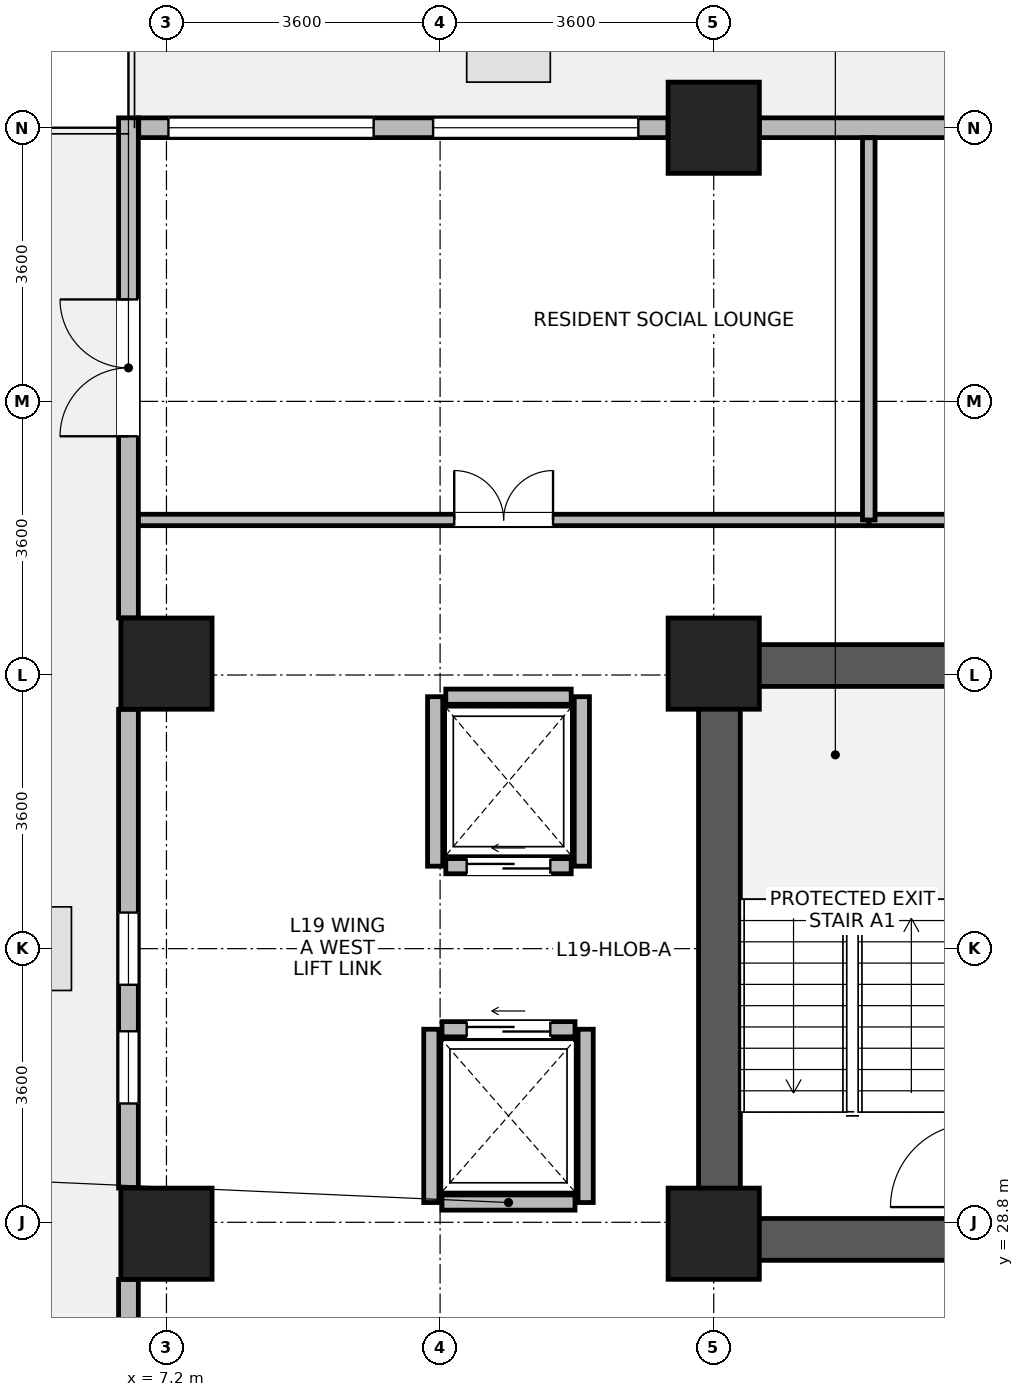
"""IFC4 building model, lengths in metres.
Left out: names, types, materials, properties, quantities, classifications, styles, units other than length and angle.
Written with IfcOpenShell. Run it as: python <this file> out.ifc"""

import sys

from ifc_helpers import new_model, si_unit, direction, frame, frame_2d, origin, origin_2d, place, context, subcontext, project, spatial, rectangle, extrude, source, transform, mapped, element, fill, save


model = new_model("IFC4")
c1 = context("Model", 3, precision=1e-05, world=origin(), true_north=direction((0.0, 1.0)))
c2 = subcontext(c1, "Body", "Model", "MODEL_VIEW")
j1 = project(units=[si_unit("LENGTHUNIT", "METRE"), si_unit("PLANEANGLEUNIT", "RADIAN")], contexts=[c1])
p1 = place(None, origin())
s1 = spatial("IfcSite", under=j1, at=p1, CompositionType="ELEMENT")
p2 = place(p1, origin())
s2 = spatial("IfcBuilding", under=s1, at=p2, CompositionType="ELEMENT")
p3 = place(p2, frame((0.0, 0.0, 78.6)))
s3 = spatial("IfcBuildingStorey", under=s2, at=p3, CompositionType="ELEMENT", Elevation=78.6)
p4 = place(p3, frame((14.475, 28.3, 0.0), z_axis=(0.0, 0.0, 1.0), x_axis=(0.0, 1.0, 0.0)))
e1 = element("IfcWall", 1, at=p4, inside=s3, PredefinedType="SHEAR", context=c2, shape_type="SweptSolid", body=[
    extrude(rectangle(XDim=8.1, YDim=0.55, at=frame_2d((4.05, 0.0))), origin(), (0.0, 0.0, 1.0), 3.45),
])
for number, where, z_axis, x_axis in (
    (2, (14.75, 28.575, 0.0), (0.0, 0.0, 1.0), (1.0, 0.0, 0.0)),
    (3, (14.75, 36.125, 0.0), (0.0, 0.0, 1.0), (1.0, 0.0, 0.0)),
):
    element("IfcWall", number, at=place(p3, frame(where, z_axis=z_axis, x_axis=x_axis)), inside=s3, PredefinedType="SHEAR", context=c2, shape_type="SweptSolid", body=[
        extrude(rectangle(XDim=3.2, YDim=0.55, at=frame_2d((1.6, 0.0))), origin(), (0.0, 0.0, 1.0), 3.45),
    ])
m1 = source(origin(), c2, "Body", "SweptSolid", [
    extrude(rectangle(XDim=1.2, YDim=1.2, at=origin_2d()), origin(), (0.0, 0.0, 1.0), 3.7),
])
for number, where, z_axis, x_axis in (
    (4, (7.2, 28.65, 0.0), (0.0, 0.0, 1.0), (1.0, 0.0, 0.0)),
    (5, (7.2, 36.15, 0.0), (0.0, 0.0, 1.0), (1.0, 0.0, 0.0)),
    (6, (14.4, 28.65, 0.0), (0.0, 0.0, 1.0), (1.0, 0.0, 0.0)),
    (7, (14.4, 36.15, 0.0), (0.0, 0.0, 1.0), (1.0, 0.0, 0.0)),
    (8, (14.4, 43.2, 0.0), (0.0, 0.0, 1.0), (1.0, 0.0, 0.0)),
):
    element("IfcColumn", number, at=place(p3, frame(where, z_axis=z_axis, x_axis=x_axis)), inside=s3, PredefinedType="COLUMN", context=c2, shape_type="MappedRepresentation", body=[
        mapped(m1, transform((0.0, 0.0, 0.0), x_axis=(1.0, 0.0, 0.0), y_axis=(0.0, 1.0, 0.0), z_axis=(0.0, 0.0, 1.0), scale=1.0)),
    ])
p5 = place(p3, frame((15.001, 43.2, 0.0), z_axis=(0.0, 0.0, 1.0), x_axis=(1.0, 0.0, 0.0)))
e9 = element("IfcWall", 9, at=p5, inside=s3, PredefinedType="STANDARD", context=c2, shape_type="SweptSolid", body=[
    extrude(rectangle(XDim=2.793, YDim=0.26, at=frame_2d((1.397, 0.0))), origin(), (0.0, 0.0, 1.0), 2.93),
])
p6 = place(p3, frame((6.835, 43.2, 0.0), z_axis=(0.0, 0.0, 1.0), x_axis=(1.0, 0.0, 0.0)))
e10 = element("IfcWall", 10, at=p6, inside=s3, PredefinedType="STANDARD", context=c2, shape_type="SweptSolid", body=[
    extrude(rectangle(XDim=6.964, YDim=0.26, at=frame_2d((3.482, 0.0))), origin(), (0.0, 0.0, 1.0), 3.43),
])
p7 = place(p6, frame((0.391, 0.0, 0.85)))
e11 = element("IfcOpeningElement", 11, at=p7, cuts=e10, PredefinedType="OPENING", context=c2, shape_type="SweptSolid", body=[
    extrude(rectangle(XDim=2.7, YDim=2.05, at=frame_2d((1.35, 1.025))), frame((0.0, 0.14, 0.0), z_axis=(0.0, -1.0, 0.0), x_axis=(1.0, 0.0, 0.0)), (0.0, 0.0, 1.0), 0.28),
])
p8 = place(p6, frame((3.873, 0.0, 0.85)))
e12 = element("IfcOpeningElement", 12, at=p8, cuts=e10, PredefinedType="OPENING", context=c2, shape_type="SweptSolid", body=[
    extrude(rectangle(XDim=2.7, YDim=2.05, at=frame_2d((1.35, 1.025))), frame((0.0, 0.14, 0.0), z_axis=(0.0, -1.0, 0.0), x_axis=(1.0, 0.0, 0.0)), (0.0, 0.0, 1.0), 0.28),
])
p9 = place(p3, frame((6.7, 36.751, 0.0), z_axis=(0.0, 0.0, 1.0), x_axis=(0.0, 1.0, 0.0)))
e13 = element("IfcWall", 13, at=p9, inside=s3, PredefinedType="STANDARD", context=c2, shape_type="SweptSolid", body=[
    extrude(rectangle(XDim=6.579, YDim=0.26, at=frame_2d((3.29, 0.0))), origin(), (0.0, 0.0, 1.0), 3.43),
])
p10 = place(p9, frame((2.39, 0.0, 0.0)))
e14 = element("IfcOpeningElement", 14, at=p10, cuts=e13, PredefinedType="OPENING", context=c2, shape_type="SweptSolid", body=[
    extrude(rectangle(XDim=1.8, YDim=2.2, at=frame_2d((0.9, 1.1))), frame((0.0, 0.14, 0.0), z_axis=(0.0, -1.0, 0.0), x_axis=(1.0, 0.0, 0.0)), (0.0, 0.0, 1.0), 0.28),
])
p11 = place(p3, frame((6.7, 29.251, 0.0), z_axis=(0.0, 0.0, 1.0), x_axis=(0.0, 1.0, 0.0)))
e15 = element("IfcWall", 15, at=p11, inside=s3, PredefinedType="STANDARD", context=c2, shape_type="SweptSolid", body=[
    extrude(rectangle(XDim=6.298, YDim=0.26, at=frame_2d((3.149, 0.0))), origin(), (0.0, 0.0, 1.0), 3.43),
])
p12 = place(p11, frame((2.674, 0.0, 0.85)))
e16 = element("IfcOpeningElement", 16, at=p12, cuts=e15, PredefinedType="OPENING", context=c2, shape_type="SweptSolid", body=[
    extrude(rectangle(XDim=0.95, YDim=1.75, at=frame_2d((0.475, 0.875))), frame((0.0, 0.14, 0.0), z_axis=(0.0, -1.0, 0.0), x_axis=(1.0, 0.0, 0.0)), (0.0, 0.0, 1.0), 0.28),
])
p13 = place(p11, frame((1.112, 0.0, 0.85)))
e17 = element("IfcOpeningElement", 17, at=p13, cuts=e15, PredefinedType="OPENING", context=c2, shape_type="SweptSolid", body=[
    extrude(rectangle(XDim=0.95, YDim=1.75, at=frame_2d((0.475, 0.875))), frame((0.0, 0.14, 0.0), z_axis=(0.0, -1.0, 0.0), x_axis=(1.0, 0.0, 0.0)), (0.0, 0.0, 1.0), 0.28),
])
p14 = place(p3, frame((6.7, 21.47, 0.0), z_axis=(0.0, 0.0, 1.0), x_axis=(0.0, 1.0, 0.0)))
e18 = element("IfcWall", 18, at=p14, inside=s3, PredefinedType="STANDARD", context=c2, shape_type="SweptSolid", body=[
    extrude(rectangle(XDim=6.579, YDim=0.26, at=frame_2d((3.29, 0.0))), origin(), (0.0, 0.0, 1.0), 3.43),
])
p15 = place(p14, frame((2.814, 0.0, 0.85)))
e19 = element("IfcOpeningElement", 19, at=p15, cuts=e18, PredefinedType="OPENING", context=c2, shape_type="SweptSolid", body=[
    extrude(rectangle(XDim=0.95, YDim=1.75, at=frame_2d((0.475, 0.875))), frame((0.0, 0.14, 0.0), z_axis=(0.0, -1.0, 0.0), x_axis=(1.0, 0.0, 0.0)), (0.0, 0.0, 1.0), 0.28),
])
p16 = place(p14, frame((1.183, 0.0, 0.85)))
e20 = element("IfcOpeningElement", 20, at=p16, cuts=e18, PredefinedType="OPENING", context=c2, shape_type="SweptSolid", body=[
    extrude(rectangle(XDim=0.95, YDim=1.75, at=frame_2d((0.475, 0.875))), frame((0.0, 0.14, 0.0), z_axis=(0.0, -1.0, 0.0), x_axis=(1.0, 0.0, 0.0)), (0.0, 0.0, 1.0), 0.28),
])
p17 = place(p3, frame((10.825, 29.06, 0.0), z_axis=(0.0, 0.0, 1.0), x_axis=(1.0, 0.0, 0.0)))
e21 = element("IfcWall", 21, at=p17, inside=s3, PredefinedType="PARTITIONING", context=c2, shape_type="SweptSolid", body=[
    extrude(rectangle(XDim=1.75, YDim=0.2, at=frame_2d((0.875, 0.0))), origin(), (0.0, 0.0, 1.0), 3.43),
])
p18 = place(p3, frame((10.825, 31.34, 0.0), z_axis=(0.0, 0.0, 1.0), x_axis=(1.0, 0.0, 0.0)))
e22 = element("IfcWall", 22, at=p18, inside=s3, PredefinedType="PARTITIONING", context=c2, shape_type="SweptSolid", body=[
    extrude(rectangle(XDim=1.75, YDim=0.2, at=frame_2d((0.875, 0.0))), origin(), (0.0, 0.0, 1.0), 3.43),
])
p19 = place(p18, frame((0.325, 0.0, 0.0)))
e23 = element("IfcOpeningElement", 23, at=p19, cuts=e22, PredefinedType="OPENING", context=c2, shape_type="SweptSolid", body=[
    extrude(rectangle(XDim=1.1, YDim=2.12, at=frame_2d((0.55, 1.06))), frame((0.0, 0.11, 0.0), z_axis=(0.0, -1.0, 0.0), x_axis=(1.0, 0.0, 0.0)), (0.0, 0.0, 1.0), 0.22),
])
for number, where, z_axis, x_axis in (
    (24, (10.685, 29.06, 0.0), (0.0, 0.0, 1.0), (0.0, 1.0, 0.0)),
    (25, (12.715, 29.06, 0.0), (0.0, 0.0, 1.0), (0.0, 1.0, 0.0)),
):
    element("IfcWall", number, at=place(p3, frame(where, z_axis=z_axis, x_axis=x_axis)), inside=s3, PredefinedType="PARTITIONING", context=c2, shape_type="SweptSolid", body=[
        extrude(rectangle(XDim=2.28, YDim=0.2, at=frame_2d((1.14, 0.0))), origin(), (0.0, 0.0, 1.0), 3.43),
    ])
p20 = place(p3, frame((10.875, 33.485, 0.0), z_axis=(0.0, 0.0, 1.0), x_axis=(1.0, 0.0, 0.0)))
e26 = element("IfcWall", 26, at=p20, inside=s3, PredefinedType="PARTITIONING", context=c2, shape_type="SweptSolid", body=[
    extrude(rectangle(XDim=1.65, YDim=0.2, at=frame_2d((0.825, 0.0))), origin(), (0.0, 0.0, 1.0), 3.43),
])
p21 = place(p20, frame((0.275, 0.0, 0.0)))
e27 = element("IfcOpeningElement", 27, at=p21, cuts=e26, PredefinedType="OPENING", context=c2, shape_type="SweptSolid", body=[
    extrude(rectangle(XDim=1.1, YDim=2.12, at=frame_2d((0.55, 1.06))), frame((0.0, 0.11, 0.0), z_axis=(0.0, -1.0, 0.0), x_axis=(1.0, 0.0, 0.0)), (0.0, 0.0, 1.0), 0.22),
])
p22 = place(p3, frame((10.875, 35.715, 0.0), z_axis=(0.0, 0.0, 1.0), x_axis=(1.0, 0.0, 0.0)))
e28 = element("IfcWall", 28, at=p22, inside=s3, PredefinedType="PARTITIONING", context=c2, shape_type="SweptSolid", body=[
    extrude(rectangle(XDim=1.65, YDim=0.2, at=frame_2d((0.825, 0.0))), origin(), (0.0, 0.0, 1.0), 3.43),
])
for number, where, z_axis, x_axis in (
    (29, (10.735, 33.485, 0.0), (0.0, 0.0, 1.0), (0.0, 1.0, 0.0)),
    (30, (12.665, 33.485, 0.0), (0.0, 0.0, 1.0), (0.0, 1.0, 0.0)),
):
    element("IfcWall", number, at=place(p3, frame(where, z_axis=z_axis, x_axis=x_axis)), inside=s3, PredefinedType="PARTITIONING", context=c2, shape_type="SweptSolid", body=[
        extrude(rectangle(XDim=2.23, YDim=0.2, at=frame_2d((1.115, 0.0))), origin(), (0.0, 0.0, 1.0), 3.43),
    ])
p23 = place(p3, frame((16.44, 38.04, 0.0), z_axis=(0.0, 0.0, 1.0), x_axis=(1.0, 0.0, 0.0)))
e31 = element("IfcWall", 31, at=p23, inside=s3, PredefinedType="PARTITIONING", context=c2, shape_type="SweptSolid", body=[
    extrude(rectangle(XDim=10.08, YDim=0.15, at=frame_2d((5.04, 0.0))), origin(), (0.0, 0.0, 1.0), 3.43),
])
p24 = place(p23, frame((4.39, 0.0, 0.0)))
e32 = element("IfcOpeningElement", 32, at=p24, cuts=e31, PredefinedType="OPENING", context=c2, shape_type="SweptSolid", body=[
    extrude(rectangle(XDim=1.3, YDim=2.12, at=frame_2d((0.65, 1.06))), frame((0.0, 0.085, 0.0), z_axis=(0.0, -1.0, 0.0), x_axis=(1.0, 0.0, 0.0)), (0.0, 0.0, 1.0), 0.17),
])
p25 = place(p3, frame((6.832, 38.04, 0.0), z_axis=(0.0, 0.0, 1.0), x_axis=(1.0, 0.0, 0.0)))
e33 = element("IfcWall", 33, at=p25, inside=s3, PredefinedType="PARTITIONING", context=c2, shape_type="SweptSolid", body=[
    extrude(rectangle(XDim=9.608, YDim=0.15, at=frame_2d((4.804, 0.0))), origin(), (0.0, 0.0, 1.0), 3.43),
])
p26 = place(p25, frame((4.154, 0.0, 0.0)))
e34 = element("IfcOpeningElement", 34, at=p26, cuts=e33, PredefinedType="OPENING", context=c2, shape_type="SweptSolid", body=[
    extrude(rectangle(XDim=1.3, YDim=2.12, at=frame_2d((0.65, 1.06))), frame((0.0, 0.085, 0.0), z_axis=(0.0, -1.0, 0.0), x_axis=(1.0, 0.0, 0.0)), (0.0, 0.0, 1.0), 0.17),
])
p27 = place(p3, frame((16.44, 38.04, 0.0), z_axis=(0.0, 0.0, 1.0), x_axis=(0.0, 1.0, 0.0)))
e35 = element("IfcWall", 35, at=p27, inside=s3, PredefinedType="PARTITIONING", context=c2, shape_type="SweptSolid", body=[
    extrude(rectangle(XDim=5.028, YDim=0.165, at=frame_2d((2.514, 0.0))), origin(), (0.0, 0.0, 1.0), 3.43),
])
p28 = place(p7, origin())
e36 = element("IfcWindow", 36, at=p28, inside=s3, PartitioningType="SINGLE_PANEL", PredefinedType="WINDOW", context=c2, shape_type="SweptSolid", body=[
    extrude(rectangle(XDim=2.7, YDim=2.05, at=frame_2d((1.35, 1.025))), frame((0.0, 0.03, 0.0), z_axis=(0.0, -1.0, 0.0), x_axis=(1.0, 0.0, 0.0)), (0.0, 0.0, 1.0), 0.06),
])
fill(e11, e36)
p29 = place(p8, origin())
e37 = element("IfcWindow", 37, at=p29, inside=s3, PartitioningType="SINGLE_PANEL", PredefinedType="WINDOW", context=c2, shape_type="SweptSolid", body=[
    extrude(rectangle(XDim=2.7, YDim=2.05, at=frame_2d((1.35, 1.025))), frame((0.0, 0.03, 0.0), z_axis=(0.0, -1.0, 0.0), x_axis=(1.0, 0.0, 0.0)), (0.0, 0.0, 1.0), 0.06),
])
fill(e12, e37)
p30 = place(p10, origin())
e38 = element("IfcDoor", 38, at=p30, inside=s3, OperationType="DOUBLE_DOOR_SINGLE_SWING", PredefinedType="DOOR", context=c2, shape_type="SweptSolid", body=[
    extrude(rectangle(XDim=1.8, YDim=2.2, at=frame_2d((0.9, 1.1))), frame((0.0, 0.025, 0.0), z_axis=(0.0, -1.0, 0.0), x_axis=(1.0, 0.0, 0.0)), (0.0, 0.0, 1.0), 0.05),
])
fill(e14, e38)
p31 = place(p12, origin())
e39 = element("IfcWindow", 39, at=p31, inside=s3, PartitioningType="SINGLE_PANEL", PredefinedType="WINDOW", context=c2, shape_type="SweptSolid", body=[
    extrude(rectangle(XDim=0.95, YDim=1.75, at=frame_2d((0.475, 0.875))), frame((0.0, 0.03, 0.0), z_axis=(0.0, -1.0, 0.0), x_axis=(1.0, 0.0, 0.0)), (0.0, 0.0, 1.0), 0.06),
])
fill(e16, e39)
p32 = place(p13, origin())
e40 = element("IfcWindow", 40, at=p32, inside=s3, PartitioningType="SINGLE_PANEL", PredefinedType="WINDOW", context=c2, shape_type="SweptSolid", body=[
    extrude(rectangle(XDim=0.95, YDim=1.75, at=frame_2d((0.475, 0.875))), frame((0.0, 0.03, 0.0), z_axis=(0.0, -1.0, 0.0), x_axis=(1.0, 0.0, 0.0)), (0.0, 0.0, 1.0), 0.06),
])
fill(e17, e40)
p33 = place(p19, origin())
e41 = element("IfcDoor", 41, at=p33, inside=s3, OperationType="SLIDING_TO_LEFT", PredefinedType="DOOR", context=c2, shape_type="SweptSolid", body=[
    extrude(rectangle(XDim=1.1, YDim=2.12, at=frame_2d((0.55, 1.06))), frame((0.0, 0.025, 0.0), z_axis=(0.0, -1.0, 0.0), x_axis=(1.0, 0.0, 0.0)), (0.0, 0.0, 1.0), 0.05),
])
fill(e23, e41)
p34 = place(p21, origin())
e42 = element("IfcDoor", 42, at=p34, inside=s3, OperationType="SLIDING_TO_LEFT", PredefinedType="DOOR", context=c2, shape_type="SweptSolid", body=[
    extrude(rectangle(XDim=1.1, YDim=2.12, at=frame_2d((0.55, 1.06))), frame((0.0, 0.025, 0.0), z_axis=(0.0, -1.0, 0.0), x_axis=(1.0, 0.0, 0.0)), (0.0, 0.0, 1.0), 0.05),
])
fill(e27, e42)
p35 = place(p26, origin())
e43 = element("IfcDoor", 43, at=p35, inside=s3, OperationType="DOUBLE_DOOR_SINGLE_SWING", PredefinedType="DOOR", context=c2, shape_type="SweptSolid", body=[
    extrude(rectangle(XDim=1.3, YDim=2.12, at=frame_2d((0.65, 1.06))), frame((0.0, 0.025, 0.0), z_axis=(0.0, -1.0, 0.0), x_axis=(1.0, 0.0, 0.0)), (0.0, 0.0, 1.0), 0.05),
])
fill(e34, e43)
save(model, sys.argv[1])
